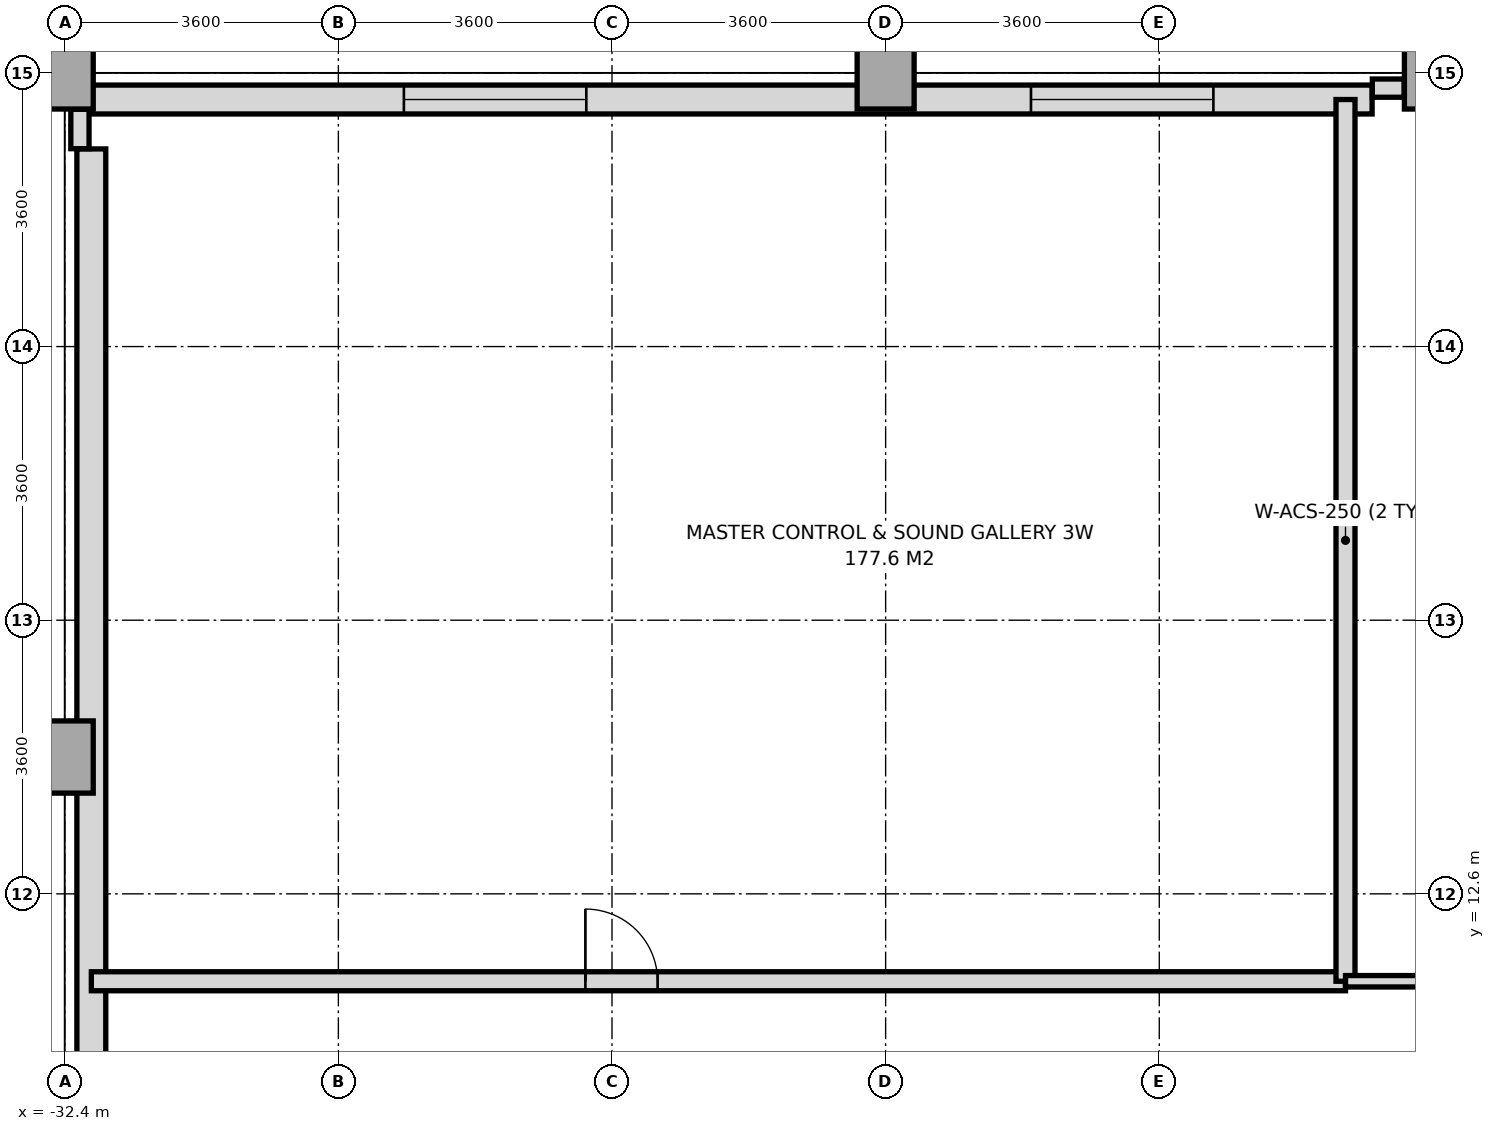
"""IFC4 building model, lengths in metres.
Left out: names, types, materials, properties, quantities, classifications, styles, units other than length and angle.
Written with IfcOpenShell. Run it as: python <this file> out.ifc"""

import sys

from ifc_helpers import new_model, si_unit, direction, frame, frame_2d, origin, origin_2d, place, context, subcontext, project, spatial, rectangle, extrude, source, transform, mapped, element, fill, save


model = new_model("IFC4")
c1 = context("Model", 3, precision=1e-05, world=origin(), true_north=direction((0.0, 1.0)))
c2 = subcontext(c1, "Body", "Model", "MODEL_VIEW")
j1 = project(units=[si_unit("LENGTHUNIT", "METRE"), si_unit("PLANEANGLEUNIT", "RADIAN")], contexts=[c1])
p1 = place(None, origin())
s1 = spatial("IfcSite", under=j1, at=p1, CompositionType="ELEMENT")
p2 = place(p1, origin())
s2 = spatial("IfcBuilding", under=s1, at=p2, CompositionType="ELEMENT")
p3 = place(p2, frame((0.0, 0.0, 15.6)))
s3 = spatial("IfcBuildingStorey", under=s2, at=p3, CompositionType="ELEMENT", Elevation=15.6)
m1 = source(origin(), c2, "Body", "SweptSolid", [
    extrude(rectangle(XDim=0.75, YDim=0.95, at=origin_2d()), origin(), (0.0, 0.0, 1.0), 4.55),
])
for number, where, z_axis, x_axis in (
    (1, (-32.4, 14.4, 0.0), (0.0, 0.0, 1.0), (1.0, 0.0, 0.0)),
    (2, (-32.4, 23.4, 0.0), (0.0, 0.0, 1.0), (1.0, 0.0, 0.0)),
    (3, (-21.6, 23.4, 0.0), (0.0, 0.0, 1.0), (1.0, 0.0, 0.0)),
    (4, (-14.4, 23.4, 0.0), (0.0, 0.0, 1.0), (1.0, 0.0, 0.0)),
):
    element("IfcColumn", number, at=place(p3, frame(where, z_axis=z_axis, x_axis=x_axis)), inside=s3, PredefinedType="COLUMN", context=c2, shape_type="MappedRepresentation", body=[
        mapped(m1, transform((0.0, 0.0, 0.0), x_axis=(1.0, 0.0, 0.0), y_axis=(0.0, 1.0, 0.0), z_axis=(0.0, 0.0, 1.0), scale=1.0)),
    ])
p4 = place(p3, frame((-32.05, 23.05, 0.0), z_axis=(0.0, 0.0, 1.0), x_axis=(1.0, 0.0, 0.0)))
e5 = element("IfcWall", 5, at=p4, inside=s3, PredefinedType="SOLIDWALL", context=c2, shape_type="SweptSolid", body=[
    extrude(rectangle(XDim=16.85, YDim=0.38, at=frame_2d((8.425, 0.0))), origin(), (0.0, 0.0, 1.0), 3.8),
])
p5 = place(p4, frame((4.112, 0.0, 0.95)))
e6 = element("IfcOpeningElement", 6, at=p5, cuts=e5, PredefinedType="OPENING", context=c2, shape_type="SweptSolid", body=[
    extrude(rectangle(XDim=2.4, YDim=2.2, at=frame_2d((1.2, 1.1))), frame((0.0, 0.2, 0.0), z_axis=(0.0, -1.0, 0.0), x_axis=(1.0, 0.0, 0.0)), (0.0, 0.0, 1.0), 0.4),
])
p6 = place(p4, frame((12.362, 0.0, 0.95)))
e7 = element("IfcOpeningElement", 7, at=p6, cuts=e5, PredefinedType="OPENING", context=c2, shape_type="SweptSolid", body=[
    extrude(rectangle(XDim=2.4, YDim=2.2, at=frame_2d((1.2, 1.1))), frame((0.0, 0.2, 0.0), z_axis=(0.0, -1.0, 0.0), x_axis=(1.0, 0.0, 0.0)), (0.0, 0.0, 1.0), 0.4),
])
p7 = place(p3, frame((-32.05, -18.8, 0.0), z_axis=(0.0, 0.0, 1.0), x_axis=(0.0, 1.0, 0.0)))
e8 = element("IfcWall", 8, at=p7, inside=s3, PredefinedType="SOLIDWALL", context=c2, shape_type="SweptSolid", body=[
    extrude(rectangle(XDim=41.2, YDim=0.38, at=frame_2d((20.6, 0.0))), origin(), (0.0, 0.0, 1.0), 3.8),
])
p8 = place(p7, frame((5.9, 0.0, 0.95)))
e9 = element("IfcOpeningElement", 9, at=p8, cuts=e8, PredefinedType="OPENING", context=c2, shape_type="SweptSolid", body=[
    extrude(rectangle(XDim=2.4, YDim=2.2, at=frame_2d((1.2, 1.1))), frame((0.0, 0.2, 0.0), z_axis=(0.0, -1.0, 0.0), x_axis=(1.0, 0.0, 0.0)), (0.0, 0.0, 1.0), 0.4),
])
p9 = place(p7, frame((13.1, 0.0, 0.95)))
e10 = element("IfcOpeningElement", 10, at=p9, cuts=e8, PredefinedType="OPENING", context=c2, shape_type="SweptSolid", body=[
    extrude(rectangle(XDim=2.4, YDim=2.2, at=frame_2d((1.2, 1.1))), frame((0.0, 0.2, 0.0), z_axis=(0.0, -1.0, 0.0), x_axis=(1.0, 0.0, 0.0)), (0.0, 0.0, 1.0), 0.4),
])
p10 = place(p7, frame((22.1, 0.0, 0.95)))
e11 = element("IfcOpeningElement", 11, at=p10, cuts=e8, PredefinedType="OPENING", context=c2, shape_type="SweptSolid", body=[
    extrude(rectangle(XDim=2.4, YDim=2.2, at=frame_2d((1.2, 1.1))), frame((0.0, 0.2, 0.0), z_axis=(0.0, -1.0, 0.0), x_axis=(1.0, 0.0, 0.0)), (0.0, 0.0, 1.0), 0.4),
])
p11 = place(p3, frame((-32.2, 22.403, 0.0), z_axis=(0.0, 0.0, 1.0), x_axis=(0.0, 1.0, 0.0)))
e12 = element("IfcWall", 12, at=p11, inside=s3, PredefinedType="PARAPET", context=c2, shape_type="SweptSolid", body=[
    extrude(rectangle(XDim=0.519, YDim=0.24, at=frame_2d((0.26, 0.0))), origin(), (0.0, 0.0, 1.0), 1.15),
])
p12 = place(p3, frame((-15.197, 23.2, 0.0), z_axis=(0.0, 0.0, 1.0), x_axis=(1.0, 0.0, 0.0)))
e13 = element("IfcWall", 13, at=p12, inside=s3, PredefinedType="PARAPET", context=c2, shape_type="SweptSolid", body=[
    extrude(rectangle(XDim=0.419, YDim=0.24, at=frame_2d((0.209, 0.0))), origin(), (0.0, 0.0, 1.0), 1.15),
])
p13 = place(p3, frame((-32.05, 11.45, 0.0), z_axis=(0.0, 0.0, 1.0), x_axis=(1.0, 0.0, 0.0)))
e14 = element("IfcWall", 14, at=p13, inside=s3, PredefinedType="SOLIDWALL", context=c2, shape_type="SweptSolid", body=[
    extrude(rectangle(XDim=16.5, YDim=0.25, at=frame_2d((8.25, 0.0))), origin(), (0.0, 0.0, 1.0), 4.55),
])
p14 = place(p13, frame((6.5, 0.0, 0.0)))
e15 = element("IfcOpeningElement", 15, at=p14, cuts=e14, PredefinedType="OPENING", context=c2, shape_type="SweptSolid", body=[
    extrude(rectangle(XDim=0.95, YDim=2.15, at=frame_2d((0.475, 1.075))), frame((0.0, 0.135, 0.0), z_axis=(0.0, -1.0, 0.0), x_axis=(1.0, 0.0, 0.0)), (0.0, 0.0, 1.0), 0.27),
])
p15 = place(p3, frame((-15.55, 11.45, 0.0), z_axis=(0.0, 0.0, 1.0), x_axis=(0.0, 1.0, 0.0)))
e16 = element("IfcWall", 16, at=p15, inside=s3, PredefinedType="SOLIDWALL", context=c2, shape_type="SweptSolid", body=[
    extrude(rectangle(XDim=11.6, YDim=0.25, at=frame_2d((5.8, 0.0))), origin(), (0.0, 0.0, 1.0), 4.55),
])
p16 = place(p3, frame((-15.55, 11.45, 0.0), z_axis=(0.0, 0.0, 1.0), x_axis=(1.0, 0.0, 0.0)))
e17 = element("IfcWall", 17, at=p16, inside=s3, PredefinedType="PARTITIONING", context=c2, shape_type="SweptSolid", body=[
    extrude(rectangle(XDim=22.45, YDim=0.15, at=frame_2d((11.225, 0.0))), origin(), (0.0, 0.0, 1.0), 3.95),
])
p17 = place(p16, frame((8.2, 0.0, 0.0)))
e18 = element("IfcOpeningElement", 18, at=p17, cuts=e17, PredefinedType="OPENING", context=c2, shape_type="SweptSolid", body=[
    extrude(rectangle(XDim=1.1, YDim=2.2, at=frame_2d((0.55, 1.1))), frame((0.0, 0.085, 0.0), z_axis=(0.0, -1.0, 0.0), x_axis=(1.0, 0.0, 0.0)), (0.0, 0.0, 1.0), 0.17),
])
m2 = source(origin(), c2, "Body", "SweptSolid", [
    extrude(rectangle(XDim=2.4, YDim=2.2, at=frame_2d((1.2, 1.1))), frame((0.0, 0.03, 0.0), z_axis=(0.0, -1.0, 0.0), x_axis=(1.0, 0.0, 0.0)), (0.0, 0.0, 1.0), 0.06),
])
p18 = place(p5, origin())
e19 = element("IfcWindow", 19, at=p18, inside=s3, PartitioningType="SINGLE_PANEL", PredefinedType="WINDOW", context=c2, shape_type="MappedRepresentation", body=[
    mapped(m2, transform((0.0, 0.0, 0.0), x_axis=(1.0, 0.0, 0.0), y_axis=(0.0, 1.0, 0.0), z_axis=(0.0, 0.0, 1.0), scale=1.0)),
])
fill(e6, e19)
p19 = place(p6, origin())
e20 = element("IfcWindow", 20, at=p19, inside=s3, PartitioningType="SINGLE_PANEL", PredefinedType="WINDOW", context=c2, shape_type="MappedRepresentation", body=[
    mapped(m2, transform((0.0, 0.0, 0.0), x_axis=(1.0, 0.0, 0.0), y_axis=(0.0, 1.0, 0.0), z_axis=(0.0, 0.0, 1.0), scale=1.0)),
])
fill(e7, e20)
m3 = source(origin(), c2, "Body", "SweptSolid", [
    extrude(rectangle(XDim=0.95, YDim=2.15, at=frame_2d((0.475, 1.075))), frame((0.0, 0.025, 0.0), z_axis=(0.0, -1.0, 0.0), x_axis=(1.0, 0.0, 0.0)), (0.0, 0.0, 1.0), 0.05),
])
p20 = place(p14, origin())
e21 = element("IfcDoor", 21, at=p20, inside=s3, OperationType="SINGLE_SWING_LEFT", PredefinedType="DOOR", context=c2, shape_type="MappedRepresentation", body=[
    mapped(m3, transform((0.0, 0.0, 0.0), x_axis=(1.0, 0.0, 0.0), y_axis=(0.0, 1.0, 0.0), z_axis=(0.0, 0.0, 1.0), scale=1.0)),
])
fill(e15, e21)
save(model, sys.argv[1])
